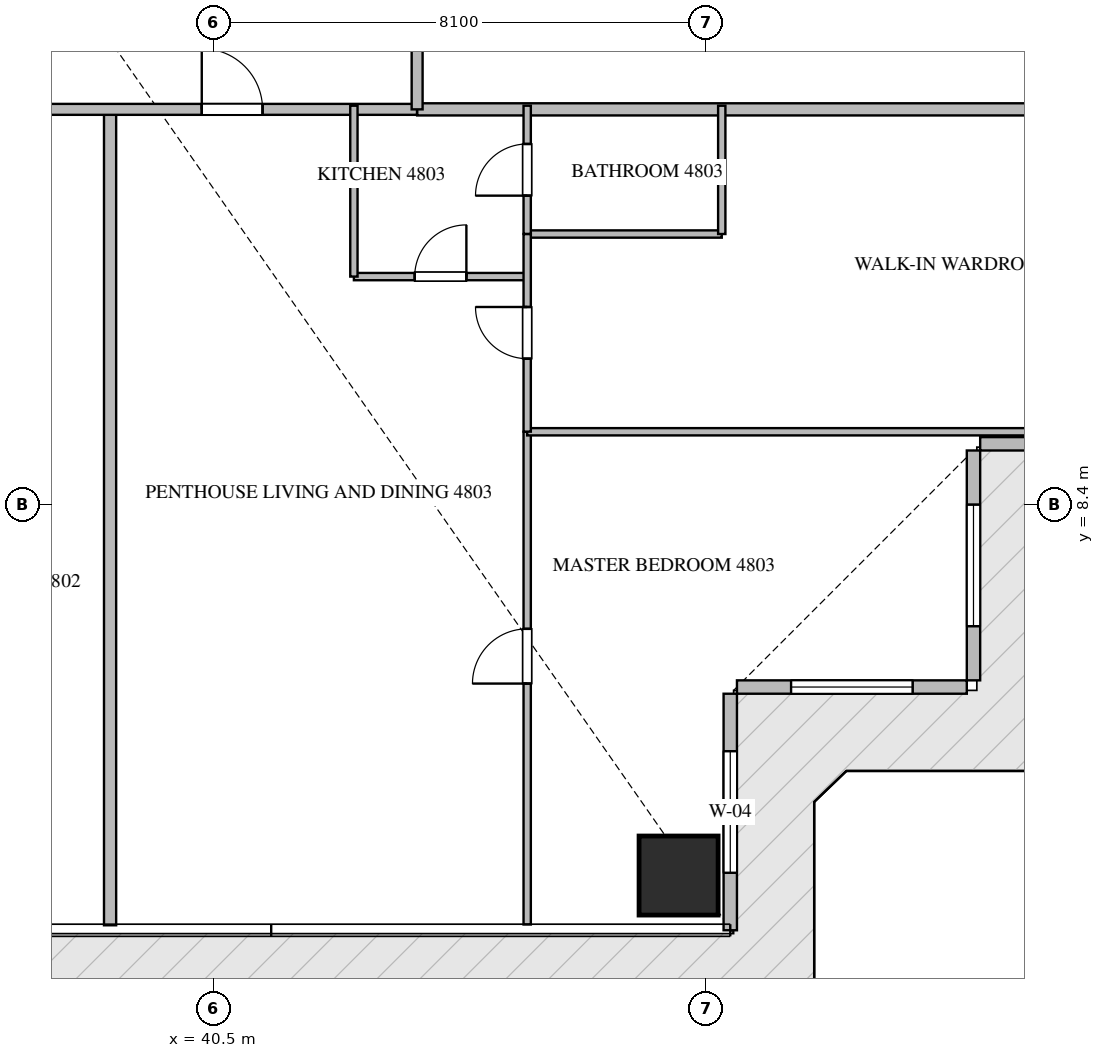
"""IFC4 building model, lengths in metres.
Left out: names, types, materials, properties, quantities, classifications, styles, units other than length and angle.
Written with IfcOpenShell. Run it as: python <this file> out.ifc"""

import sys

from ifc_helpers import new_model, si_unit, direction, frame, frame_2d, origin, origin_2d, place, context, subcontext, project, spatial, rectangle, extrude, source, transform, mapped, element, fill, save


model = new_model("IFC4")
c1 = context("Model", 3, precision=1e-05, world=origin(), true_north=direction((0.0, 1.0)))
c2 = subcontext(c1, "Body", "Model", "MODEL_VIEW")
j1 = project(units=[si_unit("LENGTHUNIT", "METRE"), si_unit("PLANEANGLEUNIT", "RADIAN")], contexts=[c1])
p1 = place(None, origin())
s1 = spatial("IfcSite", under=j1, at=p1, CompositionType="ELEMENT")
p2 = place(p1, origin())
s2 = spatial("IfcBuilding", under=s1, at=p2, CompositionType="ELEMENT")
p3 = place(p2, frame((0.0, 0.0, 191.4)))
s3 = spatial("IfcBuildingStorey", under=s2, at=p3, CompositionType="ELEMENT", Elevation=191.4)
m1 = source(origin(), c2, "Body", "SweptSolid", [
    extrude(rectangle(XDim=1.3, YDim=1.3, at=origin_2d()), origin(), (0.0, 0.0, 1.0), 3.75),
])
p4 = place(p3, frame((48.15, 2.3, -0.26), z_axis=(0.0, 0.0, 1.0), x_axis=(1.0, 0.0, 0.0)))
e1 = element("IfcColumn", 1, at=p4, inside=s3, PredefinedType="COLUMN", context=c2, shape_type="MappedRepresentation", body=[
    mapped(m1, transform((0.0, 0.0, 0.0), scale=1.0)),
])
p5 = place(p3, frame((49.0, 1.4, 0.0), z_axis=(0.0, 0.0, 1.0), x_axis=(0.0, 1.0, 0.0)))
e2 = element("IfcWall", 2, at=p5, inside=s3, PredefinedType="ELEMENTEDWALL", context=c2, shape_type="SweptSolid", body=[
    extrude(rectangle(XDim=3.89, YDim=0.22, at=frame_2d((1.945, 0.0))), origin(), (0.0, 0.0, 1.0), 3.475),
])
p6 = place(p5, frame((0.945, 0.0, 0.65)))
e3 = element("IfcOpeningElement", 3, at=p6, cuts=e2, PredefinedType="OPENING", context=c2, shape_type="SweptSolid", body=[
    extrude(rectangle(XDim=2.0, YDim=2.2, at=frame_2d((1.0, 1.1))), frame((0.0, 0.12, 0.0), z_axis=(0.0, -1.0, 0.0), x_axis=(1.0, 0.0, 0.0)), (0.0, 0.0, 1.0), 0.24),
])
p7 = place(p3, frame((49.11, 5.4, 0.0), z_axis=(0.0, 0.0, 1.0), x_axis=(1.0, 0.0, 0.0)))
e4 = element("IfcWall", 4, at=p7, inside=s3, PredefinedType="ELEMENTEDWALL", context=c2, shape_type="SweptSolid", body=[
    extrude(rectangle(XDim=3.78, YDim=0.22, at=frame_2d((1.89, 0.0))), origin(), (0.0, 0.0, 1.0), 3.475),
])
p8 = place(p7, frame((0.89, 0.0, 0.65)))
e5 = element("IfcOpeningElement", 5, at=p8, cuts=e4, PredefinedType="OPENING", context=c2, shape_type="SweptSolid", body=[
    extrude(rectangle(XDim=2.0, YDim=2.2, at=frame_2d((1.0, 1.1))), frame((0.0, 0.12, 0.0), z_axis=(0.0, -1.0, 0.0), x_axis=(1.0, 0.0, 0.0)), (0.0, 0.0, 1.0), 0.24),
])
p9 = place(p3, frame((53.0, 5.51, 0.0), z_axis=(0.0, 0.0, 1.0), x_axis=(0.0, 1.0, 0.0)))
e6 = element("IfcWall", 6, at=p9, inside=s3, PredefinedType="ELEMENTEDWALL", context=c2, shape_type="SweptSolid", body=[
    extrude(rectangle(XDim=3.78, YDim=0.22, at=frame_2d((1.89, 0.0))), origin(), (0.0, 0.0, 1.0), 3.475),
])
p10 = place(p9, frame((0.89, 0.0, 0.65)))
e7 = element("IfcOpeningElement", 7, at=p10, cuts=e6, PredefinedType="OPENING", context=c2, shape_type="SweptSolid", body=[
    extrude(rectangle(XDim=2.0, YDim=2.2, at=frame_2d((1.0, 1.1))), frame((0.0, 0.12, 0.0), z_axis=(0.0, -1.0, 0.0), x_axis=(1.0, 0.0, 0.0)), (0.0, 0.0, 1.0), 0.24),
])
p11 = place(p3, frame((53.11, 9.4, 0.0), z_axis=(0.0, 0.0, 1.0), x_axis=(1.0, 0.0, 0.0)))
e8 = element("IfcWall", 8, at=p11, inside=s3, PredefinedType="ELEMENTEDWALL", context=c2, shape_type="SweptSolid", body=[
    extrude(rectangle(XDim=3.89, YDim=0.22, at=frame_2d((1.945, 0.0))), origin(), (0.0, 0.0, 1.0), 3.475),
])
p12 = place(p3, frame((38.8, 1.482, 0.0), z_axis=(0.0, 0.0, 1.0), x_axis=(0.0, 1.0, 0.0)))
e9 = element("IfcWall", 9, at=p12, inside=s3, PredefinedType="PARTITIONING", context=c2, shape_type="SweptSolid", body=[
    extrude(rectangle(XDim=13.418, YDim=0.2, at=frame_2d((6.709, 0.0))), origin(), (0.0, 0.0, 1.0), 3.49),
])
p13 = place(p3, frame((43.85, 14.9, 0.0), z_axis=(0.0, 0.0, 1.0), x_axis=(1.0, 0.0, 0.0)))
e10 = element("IfcWall", 10, at=p13, inside=s3, PredefinedType="PARTITIONING", context=c2, shape_type="SweptSolid", body=[
    extrude(rectangle(XDim=13.068, YDim=0.2, at=frame_2d((6.534, 0.0))), origin(), (0.0, 0.0, 1.0), 3.49),
])
p14 = place(p3, frame((20.952, 14.9, 0.0), z_axis=(0.0, 0.0, 1.0), x_axis=(1.0, 0.0, 0.0)))
e11 = element("IfcWall", 11, at=p14, inside=s3, PredefinedType="PARTITIONING", context=c2, shape_type="SweptSolid", body=[
    extrude(rectangle(XDim=22.896, YDim=0.18, at=frame_2d((11.448, 0.0))), origin(), (0.0, 0.0, 1.0), 3.49),
])
p15 = place(p14, frame((2.387, 0.0, 0.0)))
e12 = element("IfcOpeningElement", 12, at=p15, cuts=e11, PredefinedType="OPENING", context=c2, shape_type="SweptSolid", body=[
    extrude(rectangle(XDim=1.0, YDim=2.15, at=frame_2d((0.5, 1.075))), frame((0.0, 0.1, 0.0), z_axis=(0.0, -1.0, 0.0), x_axis=(1.0, 0.0, 0.0)), (0.0, 0.0, 1.0), 0.2),
])
p16 = place(p14, frame((14.867, 0.0, 0.0)))
e13 = element("IfcOpeningElement", 13, at=p16, cuts=e11, PredefinedType="OPENING", context=c2, shape_type="SweptSolid", body=[
    extrude(rectangle(XDim=1.0, YDim=2.15, at=frame_2d((0.5, 1.075))), frame((0.0, 0.1, 0.0), z_axis=(0.0, -1.0, 0.0), x_axis=(1.0, 0.0, 0.0)), (0.0, 0.0, 1.0), 0.2),
])
p17 = place(p14, frame((19.356, 0.0, 0.0)))
e14 = element("IfcOpeningElement", 14, at=p17, cuts=e11, PredefinedType="OPENING", context=c2, shape_type="SweptSolid", body=[
    extrude(rectangle(XDim=1.0, YDim=2.15, at=frame_2d((0.5, 1.075))), frame((0.0, 0.1, 0.0), z_axis=(0.0, -1.0, 0.0), x_axis=(1.0, 0.0, 0.0)), (0.0, 0.0, 1.0), 0.2),
])
p18 = place(p3, frame((43.85, 14.9, 0.0), z_axis=(0.0, 0.0, 1.0), x_axis=(0.0, 1.0, 0.0)))
e15 = element("IfcWall", 15, at=p18, inside=s3, PredefinedType="PARTITIONING", context=c2, shape_type="SweptSolid", body=[
    extrude(rectangle(XDim=18.7, YDim=0.18, at=frame_2d((9.35, 0.0))), origin(), (0.0, 0.0, 1.0), 3.49),
])
p19 = place(p18, frame((1.805, 0.0, 0.0)))
e16 = element("IfcOpeningElement", 16, at=p19, cuts=e15, PredefinedType="OPENING", context=c2, shape_type="SweptSolid", body=[
    extrude(rectangle(XDim=1.0, YDim=2.15, at=frame_2d((0.5, 1.075))), frame((0.0, 0.1, 0.0), z_axis=(0.0, -1.0, 0.0), x_axis=(1.0, 0.0, 0.0)), (0.0, 0.0, 1.0), 0.2),
])
p20 = place(p3, frame((42.81, 12.15, 0.0), z_axis=(0.0, 0.0, 1.0), x_axis=(1.0, 0.0, 0.0)))
e17 = element("IfcWall", 17, at=p20, inside=s3, PredefinedType="PARTITIONING", context=c2, shape_type="SweptSolid", body=[
    extrude(rectangle(XDim=2.85, YDim=0.12, at=frame_2d((1.425, 0.0))), origin(), (0.0, 0.0, 1.0), 3.49),
])
p21 = place(p20, frame((1.0, 0.0, 0.0)))
e18 = element("IfcOpeningElement", 18, at=p21, cuts=e17, PredefinedType="OPENING", context=c2, shape_type="SweptSolid", body=[
    extrude(rectangle(XDim=0.85, YDim=2.1, at=frame_2d((0.425, 1.05))), frame((0.0, 0.07, 0.0), z_axis=(0.0, -1.0, 0.0), x_axis=(1.0, 0.0, 0.0)), (0.0, 0.0, 1.0), 0.14),
])
p22 = place(p3, frame((42.81, 12.15, 0.0), z_axis=(0.0, 0.0, 1.0), x_axis=(0.0, 1.0, 0.0)))
e19 = element("IfcWall", 19, at=p22, inside=s3, PredefinedType="PARTITIONING", context=c2, shape_type="SweptSolid", body=[
    extrude(rectangle(XDim=2.81, YDim=0.12, at=frame_2d((1.405, 0.0))), origin(), (0.0, 0.0, 1.0), 3.49),
])
p23 = place(p3, frame((45.66, 1.495, 0.0), z_axis=(0.0, 0.0, 1.0), x_axis=(0.0, 1.0, 0.0)))
e20 = element("IfcWall", 20, at=p23, inside=s3, PredefinedType="PARTITIONING", context=c2, shape_type="SweptSolid", body=[
    extrude(rectangle(XDim=8.103, YDim=0.12, at=frame_2d((4.051, 0.0))), origin(), (0.0, 0.0, 1.0), 3.49),
])
p24 = place(p23, frame((3.962, 0.0, 0.0)))
e21 = element("IfcOpeningElement", 21, at=p24, cuts=e20, PredefinedType="OPENING", context=c2, shape_type="SweptSolid", body=[
    extrude(rectangle(XDim=0.9, YDim=2.1, at=frame_2d((0.45, 1.05))), frame((0.0, 0.07, 0.0), z_axis=(0.0, -1.0, 0.0), x_axis=(1.0, 0.0, 0.0)), (0.0, 0.0, 1.0), 0.14),
])
p25 = place(p3, frame((45.66, 9.598, 0.0), z_axis=(0.0, 0.0, 1.0), x_axis=(1.0, 0.0, 0.0)))
e22 = element("IfcWall", 22, at=p25, inside=s3, PredefinedType="PARTITIONING", context=c2, shape_type="SweptSolid", body=[
    extrude(rectangle(XDim=11.245, YDim=0.12, at=frame_2d((5.623, 0.0))), origin(), (0.0, 0.0, 1.0), 3.49),
])
p26 = place(p3, frame((45.66, 12.85, 0.0), z_axis=(0.0, 0.0, 1.0), x_axis=(1.0, 0.0, 0.0)))
e23 = element("IfcWall", 23, at=p26, inside=s3, PredefinedType="PARTITIONING", context=c2, shape_type="SweptSolid", body=[
    extrude(rectangle(XDim=3.2, YDim=0.12, at=frame_2d((1.6, 0.0))), origin(), (0.0, 0.0, 1.0), 3.49),
])
p27 = place(p3, frame((48.86, 12.85, 0.0), z_axis=(0.0, 0.0, 1.0), x_axis=(0.0, 1.0, 0.0)))
e24 = element("IfcWall", 24, at=p27, inside=s3, PredefinedType="PARTITIONING", context=c2, shape_type="SweptSolid", body=[
    extrude(rectangle(XDim=2.11, YDim=0.12, at=frame_2d((1.055, 0.0))), origin(), (0.0, 0.0, 1.0), 3.49),
])
p28 = place(p3, frame((45.66, 9.6, 0.0), z_axis=(0.0, 0.0, 1.0), x_axis=(0.0, 1.0, 0.0)))
e25 = element("IfcWall", 25, at=p28, inside=s3, PredefinedType="PARTITIONING", context=c2, shape_type="SweptSolid", body=[
    extrude(rectangle(XDim=3.25, YDim=0.12, at=frame_2d((1.625, 0.0))), origin(), (0.0, 0.0, 1.0), 3.49),
])
p29 = place(p28, frame((1.2, 0.0, 0.0)))
e26 = element("IfcOpeningElement", 26, at=p29, cuts=e25, PredefinedType="OPENING", context=c2, shape_type="SweptSolid", body=[
    extrude(rectangle(XDim=0.85, YDim=2.1, at=frame_2d((0.425, 1.05))), frame((0.0, 0.07, 0.0), z_axis=(0.0, -1.0, 0.0), x_axis=(1.0, 0.0, 0.0)), (0.0, 0.0, 1.0), 0.14),
])
p30 = place(p3, frame((45.66, 12.852, 0.0), z_axis=(0.0, 0.0, 1.0), x_axis=(0.0, 1.0, 0.0)))
e27 = element("IfcWall", 27, at=p30, inside=s3, PredefinedType="PARTITIONING", context=c2, shape_type="SweptSolid", body=[
    extrude(rectangle(XDim=2.108, YDim=0.12, at=frame_2d((1.054, 0.0))), origin(), (0.0, 0.0, 1.0), 3.49),
])
p31 = place(p30, frame((0.629, 0.0, 0.0)))
e28 = element("IfcOpeningElement", 28, at=p31, cuts=e27, PredefinedType="OPENING", context=c2, shape_type="SweptSolid", body=[
    extrude(rectangle(XDim=0.85, YDim=2.1, at=frame_2d((0.425, 1.05))), frame((0.0, 0.07, 0.0), z_axis=(0.0, -1.0, 0.0), x_axis=(1.0, 0.0, 0.0)), (0.0, 0.0, 1.0), 0.14),
])
m2 = source(origin(), c2, "Body", "SweptSolid", [
    extrude(rectangle(XDim=2.0, YDim=2.2, at=frame_2d((1.0, 1.1))), frame((0.0, 0.03, 0.0), z_axis=(0.0, -1.0, 0.0), x_axis=(1.0, 0.0, 0.0)), (0.0, 0.0, 1.0), 0.06),
])
p32 = place(p6, origin())
e29 = element("IfcWindow", 29, at=p32, inside=s3, PartitioningType="SINGLE_PANEL", PredefinedType="WINDOW", context=c2, shape_type="MappedRepresentation", body=[
    mapped(m2, transform((0.0, 0.0, 0.0), scale=1.0)),
])
fill(e3, e29)
p33 = place(p8, origin())
e30 = element("IfcWindow", 30, at=p33, inside=s3, PartitioningType="SINGLE_PANEL", PredefinedType="WINDOW", context=c2, shape_type="MappedRepresentation", body=[
    mapped(m2, transform((0.0, 0.0, 0.0), scale=1.0)),
])
fill(e5, e30)
p34 = place(p10, origin())
e31 = element("IfcWindow", 31, at=p34, inside=s3, PartitioningType="SINGLE_PANEL", PredefinedType="WINDOW", context=c2, shape_type="MappedRepresentation", body=[
    mapped(m2, transform((0.0, 0.0, 0.0), scale=1.0)),
])
fill(e7, e31)
m3 = source(origin(), c2, "Body", "SweptSolid", [
    extrude(rectangle(XDim=1.0, YDim=2.15, at=frame_2d((0.5, 1.075))), frame((0.0, 0.025, 0.0), z_axis=(0.0, -1.0, 0.0), x_axis=(1.0, 0.0, 0.0)), (0.0, 0.0, 1.0), 0.05),
])
p35 = place(p17, origin())
e32 = element("IfcDoor", 32, at=p35, inside=s3, OperationType="SINGLE_SWING_LEFT", PredefinedType="DOOR", context=c2, shape_type="MappedRepresentation", body=[
    mapped(m3, transform((0.0, 0.0, 0.0), scale=1.0)),
])
fill(e14, e32)
m4 = source(origin(), c2, "Body", "SweptSolid", [
    extrude(rectangle(XDim=0.85, YDim=2.1, at=frame_2d((0.425, 1.05))), frame((0.0, 0.025, 0.0), z_axis=(0.0, -1.0, 0.0), x_axis=(1.0, 0.0, 0.0)), (0.0, 0.0, 1.0), 0.05),
])
p36 = place(p21, origin())
e33 = element("IfcDoor", 33, at=p36, inside=s3, OperationType="SINGLE_SWING_RIGHT", PredefinedType="DOOR", context=c2, shape_type="MappedRepresentation", body=[
    mapped(m4, transform((0.0, 0.0, 0.0), scale=1.0)),
])
fill(e18, e33)
m5 = source(origin(), c2, "Body", "SweptSolid", [
    extrude(rectangle(XDim=0.9, YDim=2.1, at=frame_2d((0.45, 1.05))), frame((0.0, 0.025, 0.0), z_axis=(0.0, -1.0, 0.0), x_axis=(1.0, 0.0, 0.0)), (0.0, 0.0, 1.0), 0.05),
])
p37 = place(p24, origin())
e34 = element("IfcDoor", 34, at=p37, inside=s3, OperationType="SINGLE_SWING_LEFT", PredefinedType="DOOR", context=c2, shape_type="MappedRepresentation", body=[
    mapped(m5, transform((0.0, 0.0, 0.0), scale=1.0)),
])
fill(e21, e34)
p38 = place(p29, origin())
e35 = element("IfcDoor", 35, at=p38, inside=s3, OperationType="SINGLE_SWING_RIGHT", PredefinedType="DOOR", context=c2, shape_type="MappedRepresentation", body=[
    mapped(m4, transform((0.0, 0.0, 0.0), scale=1.0)),
])
fill(e26, e35)
p39 = place(p31, origin())
e36 = element("IfcDoor", 36, at=p39, inside=s3, OperationType="SINGLE_SWING_LEFT", PredefinedType="DOOR", context=c2, shape_type="MappedRepresentation", body=[
    mapped(m4, transform((0.0, 0.0, 0.0), scale=1.0)),
])
fill(e28, e36)
save(model, sys.argv[1])
